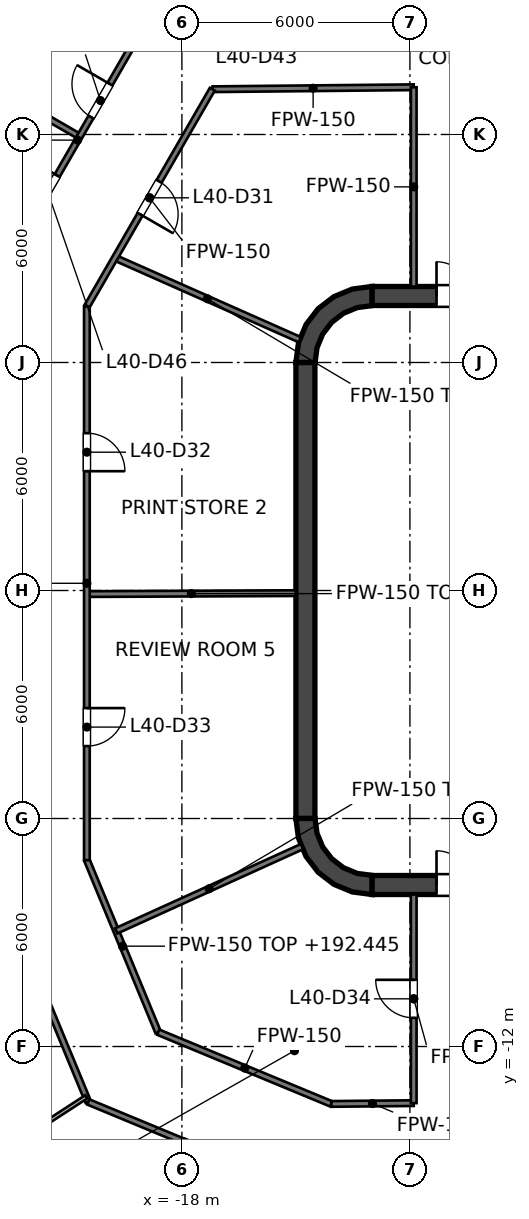
"""IFC4 building model, lengths in metres.
Left out: names, types, materials, properties, quantities, classifications, styles, units other than length and angle.
Written with IfcOpenShell. Run it as: python <this file> out.ifc"""

import sys

from ifc_helpers import new_model, si_unit, direction, frame, frame_2d, origin, place, context, subcontext, project, spatial, polyline, rectangle, outline, extrude, element, fill, save


model = new_model("IFC4")
c1 = context("Model", 3, precision=1e-05, world=origin(), true_north=direction((0.0, 1.0)))
c2 = subcontext(c1, "Body", "Model", "MODEL_VIEW")
j1 = project(units=[si_unit("LENGTHUNIT", "METRE"), si_unit("PLANEANGLEUNIT", "RADIAN")], contexts=[c1])
p1 = place(None, origin())
s1 = spatial("IfcSite", under=j1, at=p1, CompositionType="ELEMENT")
p2 = place(p1, origin())
s2 = spatial("IfcBuilding", under=s1, at=p2, CompositionType="ELEMENT")
p3 = place(p2, frame((0.0, 0.0, 189.6)))
s3 = spatial("IfcBuildingStorey", under=s2, at=p3, CompositionType="ELEMENT", Elevation=189.6)
p4 = place(p3, frame((-13.0, 7.75, 0.0), z_axis=(0.0, 0.0, 1.0), x_axis=(1.0, 0.0, 0.0)))
e1 = element("IfcWall", 1, at=p4, inside=s3, PredefinedType="SHEAR", context=c2, shape_type="SweptSolid", body=[
    extrude(rectangle(XDim=26.0, YDim=0.5, at=frame_2d((13.0, 0.0))), origin(), (0.0, 0.0, 1.0), 4.0),
])
p5 = place(p4, frame((1.7, 0.0, 0.0)))
e2 = element("IfcOpeningElement", 2, at=p5, cuts=e1, PredefinedType="OPENING", context=c2, shape_type="SweptSolid", body=[
    extrude(rectangle(XDim=1.8, YDim=2.1, at=frame_2d((0.9, 1.05))), frame((0.0, 0.25, 0.0), z_axis=(0.0, -1.0, 0.0), x_axis=(1.0, 0.0, 0.0)), (0.0, 0.0, 1.0), 0.5),
])
p6 = place(p4, frame((22.5, 0.0, 0.0)))
e3 = element("IfcOpeningElement", 3, at=p6, cuts=e1, PredefinedType="OPENING", context=c2, shape_type="SweptSolid", body=[
    extrude(rectangle(XDim=1.8, YDim=2.1, at=frame_2d((0.9, 1.05))), frame((0.0, 0.25, 0.0), z_axis=(0.0, -1.0, 0.0), x_axis=(1.0, 0.0, 0.0)), (0.0, 0.0, 1.0), 0.5),
])
p7 = place(p3, frame((-13.0, -7.75, 0.0), z_axis=(0.0, 0.0, 1.0), x_axis=(1.0, 0.0, 0.0)))
e4 = element("IfcWall", 4, at=p7, inside=s3, PredefinedType="SHEAR", context=c2, shape_type="SweptSolid", body=[
    extrude(rectangle(XDim=26.0, YDim=0.5, at=frame_2d((13.0, 0.0))), origin(), (0.0, 0.0, 1.0), 4.0),
])
p8 = place(p7, frame((1.7, 0.0, 0.0)))
e5 = element("IfcOpeningElement", 5, at=p8, cuts=e4, PredefinedType="OPENING", context=c2, shape_type="SweptSolid", body=[
    extrude(rectangle(XDim=1.8, YDim=2.1, at=frame_2d((0.9, 1.05))), frame((0.0, 0.25, 0.0), z_axis=(0.0, -1.0, 0.0), x_axis=(1.0, 0.0, 0.0)), (0.0, 0.0, 1.0), 0.5),
])
p9 = place(p7, frame((22.5, 0.0, 0.0)))
e6 = element("IfcOpeningElement", 6, at=p9, cuts=e4, PredefinedType="OPENING", context=c2, shape_type="SweptSolid", body=[
    extrude(rectangle(XDim=1.8, YDim=2.1, at=frame_2d((0.9, 1.05))), frame((0.0, 0.25, 0.0), z_axis=(0.0, -1.0, 0.0), x_axis=(1.0, 0.0, 0.0)), (0.0, 0.0, 1.0), 0.5),
])
p10 = place(p3, frame((-14.75, -6.0, 0.0), z_axis=(0.0, 0.0, 1.0), x_axis=(0.0, 1.0, 0.0)))
e7 = element("IfcWall", 7, at=p10, inside=s3, PredefinedType="SHEAR", context=c2, shape_type="SweptSolid", body=[
    extrude(rectangle(XDim=12.0, YDim=0.5, at=frame_2d((6.0, 0.0))), origin(), (0.0, 0.0, 1.0), 4.0),
])
p11 = place(p3, origin())
e8 = element("IfcWall", 8, at=p11, inside=s3, PredefinedType="SHEAR", context=c2, shape_type="SweptSolid", body=[
    extrude(outline(polyline([(-15.0, 6.0), (-14.496, 6.0), (-14.445, 6.387), (-14.295, 6.748), (-14.058, 7.058), (-13.748, 7.295), (-13.387, 7.445), (-13.0, 7.496), (-13.0, 8.0), (-13.518, 7.932), (-14.0, 7.732), (-14.414, 7.414), (-14.732, 7.0), (-14.932, 6.518), (-15.0, 6.0)])), origin(), (0.0, 0.0, 1.0), 4.0),
])
e9 = element("IfcWall", 9, at=p11, inside=s3, PredefinedType="SHEAR", context=c2, shape_type="SweptSolid", body=[
    extrude(outline(polyline([(-13.0, -8.0), (-13.0, -7.496), (-13.387, -7.445), (-13.748, -7.295), (-14.058, -7.058), (-14.295, -6.748), (-14.445, -6.387), (-14.496, -6.0), (-15.0, -6.0), (-14.932, -6.518), (-14.732, -7.0), (-14.414, -7.414), (-14.0, -7.732), (-13.518, -7.932), (-13.0, -8.0)])), origin(), (0.0, 0.0, 1.0), 4.0),
])
p12 = place(p3, frame((-11.8, -7.5, 0.0), z_axis=(0.0, 0.0, 1.0), x_axis=(0.0, 1.0, 0.0)))
e10 = element("IfcWall", 10, at=p12, inside=s3, PredefinedType="SOLIDWALL", context=c2, shape_type="SweptSolid", body=[
    extrude(rectangle(XDim=15.0, YDim=0.4, at=frame_2d((7.5, 0.0))), origin(), (0.0, 0.0, 1.0), 3.85),
])
p13 = place(p12, frame((11.3, 0.0, 0.0)))
e11 = element("IfcOpeningElement", 11, at=p13, cuts=e10, PredefinedType="OPENING", context=c2, shape_type="SweptSolid", body=[
    extrude(rectangle(XDim=1.1, YDim=2.1, at=frame_2d((0.55, 1.05))), frame((0.0, 0.2, 0.0), z_axis=(0.0, -1.0, 0.0), x_axis=(1.0, 0.0, 0.0)), (0.0, 0.0, 1.0), 0.4),
])
p14 = place(p12, frame((8.4, 0.0, 0.0)))
e12 = element("IfcOpeningElement", 12, at=p14, cuts=e10, PredefinedType="OPENING", context=c2, shape_type="SweptSolid", body=[
    extrude(rectangle(XDim=1.1, YDim=2.1, at=frame_2d((0.55, 1.05))), frame((0.0, 0.2, 0.0), z_axis=(0.0, -1.0, 0.0), x_axis=(1.0, 0.0, 0.0)), (0.0, 0.0, 1.0), 0.4),
])
p15 = place(p12, frame((5.5, 0.0, 0.0)))
e13 = element("IfcOpeningElement", 13, at=p15, cuts=e10, PredefinedType="OPENING", context=c2, shape_type="SweptSolid", body=[
    extrude(rectangle(XDim=1.1, YDim=2.1, at=frame_2d((0.55, 1.05))), frame((0.0, 0.2, 0.0), z_axis=(0.0, -1.0, 0.0), x_axis=(1.0, 0.0, 0.0)), (0.0, 0.0, 1.0), 0.4),
])
p16 = place(p12, frame((13.697, 0.0, 0.0)))
e14 = element("IfcOpeningElement", 14, at=p16, cuts=e10, PredefinedType="OPENING", context=c2, shape_type="SweptSolid", body=[
    extrude(rectangle(XDim=0.9, YDim=2.1, at=frame_2d((0.45, 1.05))), frame((0.0, 0.2, 0.0), z_axis=(0.0, -1.0, 0.0), x_axis=(1.0, 0.0, 0.0)), (0.0, 0.0, 1.0), 0.4),
])
p17 = place(p12, frame((0.403, 0.0, 0.0)))
e15 = element("IfcOpeningElement", 15, at=p17, cuts=e10, PredefinedType="OPENING", context=c2, shape_type="SweptSolid", body=[
    extrude(rectangle(XDim=0.9, YDim=2.1, at=frame_2d((0.45, 1.05))), frame((0.0, 0.2, 0.0), z_axis=(0.0, -1.0, 0.0), x_axis=(1.0, 0.0, 0.0)), (0.0, 0.0, 1.0), 0.4),
])
e16 = element("IfcWall", 16, at=p11, inside=s3, PredefinedType="SOLIDWALL", context=c2, shape_type="SweptSolid", body=[
    extrude(outline(polyline([(-12.0, -5.925), (-12.0, -5.675), (-14.25, -5.675), (-14.25, -3.025), (-12.0, -3.025), (-12.0, -2.775), (-14.25, -2.775), (-14.25, -0.125), (-12.0, -0.125), (-12.0, 0.125), (-14.25, 0.125), (-14.25, 2.775), (-12.0, 2.775), (-12.0, 3.025), (-14.25, 3.025), (-14.25, 5.675), (-12.0, 5.675), (-12.0, 5.925), (-14.25, 5.925), (-14.5, 5.925), (-14.5, 5.675), (-14.5, 3.025), (-14.5, 2.775), (-14.5, 0.125), (-14.5, -0.125), (-14.5, -2.775), (-14.5, -3.025), (-14.5, -5.675), (-14.5, -5.925), (-14.25, -5.925), (-12.0, -5.925)])), origin(), (0.0, 0.0, 1.0), 3.85),
])
p18 = place(p3, frame((-22.9, -7.572, 0.0), z_axis=(0.0, 0.0, 1.0), x_axis=(0.382367581622, -0.924010298928, 0.0)))
e17 = element("IfcWall", 17, at=p18, inside=s3, PredefinedType="PARTITIONING", context=c2, shape_type="SweptSolid", body=[
    extrude(rectangle(XDim=6.374, YDim=0.15, at=frame_2d((3.187, 0.0))), origin(), (0.0, 0.0, 1.0), 2.777),
])
p19 = place(p18, frame((2.6, 0.0, 0.0)))
e18 = element("IfcOpeningElement", 18, at=p19, cuts=e17, PredefinedType="OPENING", context=c2, shape_type="SweptSolid", body=[
    extrude(rectangle(XDim=1.0, YDim=2.1, at=frame_2d((0.5, 1.05))), frame((0.0, 0.075, 0.0), z_axis=(0.0, -1.0, 0.0), x_axis=(1.0, 0.0, 0.0)), (0.0, 0.0, 1.0), 0.15),
])
p20 = place(p3, frame((-20.5, -7.095, 0.0), z_axis=(0.0, 0.0, 1.0), x_axis=(0.382364990163, -0.924011371303, 0.0)))
e19 = element("IfcWall", 19, at=p20, inside=s3, PredefinedType="PARTITIONING", context=c2, shape_type="SweptSolid", body=[
    extrude(rectangle(XDim=4.902, YDim=0.15, at=frame_2d((2.451, 0.0))), origin(), (0.0, 0.0, 1.0), 2.845),
])
p21 = place(p3, frame((-24.433, 14.106, 0.0), z_axis=(0.0, 0.0, 1.0), x_axis=(0.866048255864, -0.499960416948, 0.0)))
e20 = element("IfcWall", 20, at=p21, inside=s3, PredefinedType="PARTITIONING", context=c2, shape_type="SweptSolid", body=[
    extrude(rectangle(XDim=4.322, YDim=0.15, at=frame_2d((2.161, 0.0))), origin(), (0.0, 0.0, 1.0), 2.845),
])
p22 = place(p3, frame((-19.76, 8.755, 0.0), z_axis=(0.0, 0.0, 1.0), x_axis=(0.91424834547, -0.405154245695, 0.0)))
e21 = element("IfcWall", 21, at=p22, inside=s3, PredefinedType="PARTITIONING", context=c2, shape_type="SweptSolid", body=[
    extrude(rectangle(XDim=5.318, YDim=0.15, at=frame_2d((2.659, 0.0))), origin(), (0.0, 0.0, 1.0), 2.845),
])
p23 = place(p3, frame((-20.46, -13.46, 0.0), z_axis=(0.0, 0.0, 1.0), x_axis=(0.923801547606, -0.382871650349, 0.0)))
e22 = element("IfcWall", 22, at=p23, inside=s3, PredefinedType="PARTITIONING", context=c2, shape_type="SweptSolid", body=[
    extrude(rectangle(XDim=6.415, YDim=0.15, at=frame_2d((3.208, 0.0))), origin(), (0.0, 0.0, 1.0), 2.777),
])
p24 = place(p23, frame((2.707, 0.0, 0.0)))
e23 = element("IfcOpeningElement", 23, at=p24, cuts=e22, PredefinedType="OPENING", context=c2, shape_type="SweptSolid", body=[
    extrude(rectangle(XDim=1.0, YDim=2.1, at=frame_2d((0.5, 1.05))), frame((0.0, 0.075, 0.0), z_axis=(0.0, -1.0, 0.0), x_axis=(1.0, 0.0, 0.0)), (0.0, 0.0, 1.0), 0.15),
])
p25 = place(p3, frame((-18.623, -11.623, 0.0), z_axis=(0.0, 0.0, 1.0), x_axis=(0.923791670587, -0.38289548098, 0.0)))
e24 = element("IfcWall", 24, at=p25, inside=s3, PredefinedType="PARTITIONING", context=c2, shape_type="SweptSolid", body=[
    extrude(rectangle(XDim=4.931, YDim=0.15, at=frame_2d((2.465, 0.0))), origin(), (0.0, 0.0, 1.0), 2.777),
])
p26 = place(p3, frame((-20.5, -0.094, 0.0), z_axis=(0.0, 0.0, 1.0), x_axis=(0.999990148138, 0.004438876723, 0.0)))
e25 = element("IfcWall", 25, at=p26, inside=s3, PredefinedType="PARTITIONING", context=c2, shape_type="SweptSolid", body=[
    extrude(rectangle(XDim=5.5, YDim=0.15, at=frame_2d((2.75, 0.0))), origin(), (0.0, 0.0, 1.0), 2.768),
])
p27 = place(p3, frame((-14.068, -13.511, 0.0), z_axis=(0.0, 0.0, 1.0), x_axis=(0.999950911515, 0.009908307647, 0.0)))
e26 = element("IfcWall", 26, at=p27, inside=s3, PredefinedType="PARTITIONING", context=c2, shape_type="SweptSolid", body=[
    extrude(rectangle(XDim=2.168, YDim=0.15, at=frame_2d((1.084, 0.0))), origin(), (0.0, 0.0, 1.0), 2.777),
])
p28 = place(p3, frame((-17.194, 13.191, 0.0), z_axis=(0.0, 0.0, 1.0), x_axis=(0.999950853109, 0.009914200296, 0.0)))
e27 = element("IfcWall", 27, at=p28, inside=s3, PredefinedType="PARTITIONING", context=c2, shape_type="SweptSolid", body=[
    extrude(rectangle(XDim=5.294, YDim=0.15, at=frame_2d((2.647, 0.0))), origin(), (0.0, 0.0, 1.0), 2.777),
])
p29 = place(p3, frame((-19.728, -8.958, 0.0), z_axis=(0.0, 0.0, 1.0), x_axis=(0.910629511797, 0.413223779863, 0.0)))
e28 = element("IfcWall", 28, at=p29, inside=s3, PredefinedType="PARTITIONING", context=c2, shape_type="SweptSolid", body=[
    extrude(rectangle(XDim=5.368, YDim=0.15, at=frame_2d((2.684, 0.0))), origin(), (0.0, 0.0, 1.0), 3.7),
])
p30 = place(p3, frame((-20.5, 7.474, 0.0), z_axis=(0.0, 0.0, 1.0), x_axis=(0.499957196903, 0.866050114754, 0.0)))
e29 = element("IfcWall", 29, at=p30, inside=s3, PredefinedType="PARTITIONING", context=c2, shape_type="SweptSolid", body=[
    extrude(rectangle(XDim=6.602, YDim=0.15, at=frame_2d((3.301, 0.0))), origin(), (0.0, 0.0, 1.0), 2.777),
])
p31 = place(p30, frame((2.802, 0.0, 0.0)))
e30 = element("IfcOpeningElement", 30, at=p31, cuts=e29, PredefinedType="OPENING", context=c2, shape_type="SweptSolid", body=[
    extrude(rectangle(XDim=1.0, YDim=2.1, at=frame_2d((0.5, 1.05))), frame((0.0, 0.075, 0.0), z_axis=(0.0, -1.0, 0.0), x_axis=(1.0, 0.0, 0.0)), (0.0, 0.0, 1.0), 0.15),
])
p32 = place(p3, frame((-22.9, 8.117, 0.0), z_axis=(0.0, 0.0, 1.0), x_axis=(0.499950307977, 0.866054091587, 0.0)))
e31 = element("IfcWall", 31, at=p32, inside=s3, PredefinedType="PARTITIONING", context=c2, shape_type="SweptSolid", body=[
    extrude(rectangle(XDim=8.626, YDim=0.15, at=frame_2d((4.313, 0.0))), origin(), (0.0, 0.0, 1.0), 2.777),
])
p33 = place(p32, frame((5.015, 0.0, 0.0)))
e32 = element("IfcOpeningElement", 32, at=p33, cuts=e31, PredefinedType="OPENING", context=c2, shape_type="SweptSolid", body=[
    extrude(rectangle(XDim=1.0, YDim=2.1, at=frame_2d((0.5, 1.05))), frame((0.0, 0.075, 0.0), z_axis=(0.0, -1.0, 0.0), x_axis=(1.0, 0.0, 0.0)), (0.0, 0.0, 1.0), 0.15),
])
p34 = place(p32, frame((2.237, 0.0, 0.0)))
e33 = element("IfcOpeningElement", 33, at=p34, cuts=e31, PredefinedType="OPENING", context=c2, shape_type="SweptSolid", body=[
    extrude(rectangle(XDim=1.0, YDim=2.1, at=frame_2d((0.5, 1.05))), frame((0.0, 0.075, 0.0), z_axis=(0.0, -1.0, 0.0), x_axis=(1.0, 0.0, 0.0)), (0.0, 0.0, 1.0), 0.15),
])
p35 = place(p3, frame((-11.9, -13.49, 0.0), z_axis=(0.0, 0.0, 1.0), x_axis=(0.0, 1.0, 0.0)))
e34 = element("IfcWall", 34, at=p35, inside=s3, PredefinedType="PARTITIONING", context=c2, shape_type="SweptSolid", body=[
    extrude(rectangle(XDim=5.49, YDim=0.15, at=frame_2d((2.745, 0.0))), origin(), (0.0, 0.0, 1.0), 2.777),
])
p36 = place(p35, frame((2.245, 0.0, 0.0)))
e35 = element("IfcOpeningElement", 35, at=p36, cuts=e34, PredefinedType="OPENING", context=c2, shape_type="SweptSolid", body=[
    extrude(rectangle(XDim=1.0, YDim=2.1, at=frame_2d((0.5, 1.05))), frame((0.0, 0.075, 0.0), z_axis=(0.0, -1.0, 0.0), x_axis=(1.0, 0.0, 0.0)), (0.0, 0.0, 1.0), 0.15),
])
p37 = place(p3, frame((-11.9, 8.0, 0.0), z_axis=(0.0, 0.0, 1.0), x_axis=(0.0, 1.0, 0.0)))
e36 = element("IfcWall", 36, at=p37, inside=s3, PredefinedType="PARTITIONING", context=c2, shape_type="SweptSolid", body=[
    extrude(rectangle(XDim=5.243, YDim=0.15, at=frame_2d((2.622, 0.0))), origin(), (0.0, 0.0, 1.0), 2.777),
])
p38 = place(p3, frame((-20.5, -7.095, 0.0), z_axis=(0.0, 0.0, 1.0), x_axis=(0.0, 1.0, 0.0)))
e37 = element("IfcWall", 37, at=p38, inside=s3, PredefinedType="PARTITIONING", context=c2, shape_type="SweptSolid", body=[
    extrude(rectangle(XDim=14.569, YDim=0.15, at=frame_2d((7.285, 0.0))), origin(), (0.0, 0.0, 1.0), 2.768),
])
p39 = place(p38, frame((10.234, 0.0, 0.0)))
e38 = element("IfcOpeningElement", 38, at=p39, cuts=e37, PredefinedType="OPENING", context=c2, shape_type="SweptSolid", body=[
    extrude(rectangle(XDim=1.0, YDim=2.1, at=frame_2d((0.5, 1.05))), frame((0.0, 0.075, 0.0), z_axis=(0.0, -1.0, 0.0), x_axis=(1.0, 0.0, 0.0)), (0.0, 0.0, 1.0), 0.15),
])
p40 = place(p38, frame((3.0, 0.0, 0.0)))
e39 = element("IfcOpeningElement", 39, at=p40, cuts=e37, PredefinedType="OPENING", context=c2, shape_type="SweptSolid", body=[
    extrude(rectangle(XDim=1.0, YDim=2.1, at=frame_2d((0.5, 1.05))), frame((0.0, 0.075, 0.0), z_axis=(0.0, -1.0, 0.0), x_axis=(1.0, 0.0, 0.0)), (0.0, 0.0, 1.0), 0.15),
])
p41 = place(p3, frame((-23.271, -15.113, 0.0), z_axis=(0.0, 0.0, 1.0), x_axis=(0.83866769183, 0.544643463819, 0.0)))
e40 = element("IfcWall", 40, at=p41, inside=s3, PredefinedType="PARTITIONING", context=c2, shape_type="SweptSolid", body=[
    extrude(rectangle(XDim=3.285, YDim=0.1, at=frame_2d((1.643, 0.0))), origin(), (0.0, 0.0, 1.0), 3.273),
])
p42 = place(p13, origin())
e41 = element("IfcDoor", 41, at=p42, inside=s3, OperationType="DOUBLE_DOOR_SLIDING", PredefinedType="DOOR", context=c2, shape_type="SweptSolid", body=[
    extrude(rectangle(XDim=1.1, YDim=2.1, at=frame_2d((0.55, 1.05))), frame((0.0, 0.025, 0.0), z_axis=(0.0, -1.0, 0.0), x_axis=(1.0, 0.0, 0.0)), (0.0, 0.0, 1.0), 0.05),
])
fill(e11, e41)
p43 = place(p14, origin())
e42 = element("IfcDoor", 42, at=p43, inside=s3, OperationType="DOUBLE_DOOR_SLIDING", PredefinedType="DOOR", context=c2, shape_type="SweptSolid", body=[
    extrude(rectangle(XDim=1.1, YDim=2.1, at=frame_2d((0.55, 1.05))), frame((0.0, 0.025, 0.0), z_axis=(0.0, -1.0, 0.0), x_axis=(1.0, 0.0, 0.0)), (0.0, 0.0, 1.0), 0.05),
])
fill(e12, e42)
p44 = place(p15, origin())
e43 = element("IfcDoor", 43, at=p44, inside=s3, OperationType="DOUBLE_DOOR_SLIDING", PredefinedType="DOOR", context=c2, shape_type="SweptSolid", body=[
    extrude(rectangle(XDim=1.1, YDim=2.1, at=frame_2d((0.55, 1.05))), frame((0.0, 0.025, 0.0), z_axis=(0.0, -1.0, 0.0), x_axis=(1.0, 0.0, 0.0)), (0.0, 0.0, 1.0), 0.05),
])
fill(e13, e43)
p45 = place(p16, origin())
e44 = element("IfcDoor", 44, at=p45, inside=s3, OperationType="SINGLE_SWING_LEFT", PredefinedType="DOOR", context=c2, shape_type="SweptSolid", body=[
    extrude(rectangle(XDim=0.9, YDim=2.1, at=frame_2d((0.45, 1.05))), frame((0.0, 0.025, 0.0), z_axis=(0.0, -1.0, 0.0), x_axis=(1.0, 0.0, 0.0)), (0.0, 0.0, 1.0), 0.05),
])
fill(e14, e44)
p46 = place(p17, origin())
e45 = element("IfcDoor", 45, at=p46, inside=s3, OperationType="SINGLE_SWING_LEFT", PredefinedType="DOOR", context=c2, shape_type="SweptSolid", body=[
    extrude(rectangle(XDim=0.9, YDim=2.1, at=frame_2d((0.45, 1.05))), frame((0.0, 0.025, 0.0), z_axis=(0.0, -1.0, 0.0), x_axis=(1.0, 0.0, 0.0)), (0.0, 0.0, 1.0), 0.05),
])
fill(e15, e45)
p47 = place(p5, origin())
e46 = element("IfcDoor", 46, at=p47, inside=s3, OperationType="DOUBLE_DOOR_SINGLE_SWING", PredefinedType="DOOR", context=c2, shape_type="SweptSolid", body=[
    extrude(rectangle(XDim=1.8, YDim=2.1, at=frame_2d((0.9, 1.05))), frame((0.0, 0.025, 0.0), z_axis=(0.0, -1.0, 0.0), x_axis=(1.0, 0.0, 0.0)), (0.0, 0.0, 1.0), 0.05),
])
fill(e2, e46)
p48 = place(p8, origin())
e47 = element("IfcDoor", 47, at=p48, inside=s3, OperationType="DOUBLE_DOOR_SINGLE_SWING", PredefinedType="DOOR", context=c2, shape_type="SweptSolid", body=[
    extrude(rectangle(XDim=1.8, YDim=2.1, at=frame_2d((0.9, 1.05))), frame((0.0, 0.025, 0.0), z_axis=(0.0, -1.0, 0.0), x_axis=(1.0, 0.0, 0.0)), (0.0, 0.0, 1.0), 0.05),
])
fill(e5, e47)
p49 = place(p31, origin())
e48 = element("IfcDoor", 48, at=p49, inside=s3, OperationType="SINGLE_SWING_LEFT", PredefinedType="DOOR", context=c2, shape_type="SweptSolid", body=[
    extrude(rectangle(XDim=1.0, YDim=2.1, at=frame_2d((0.5, 1.05))), frame((0.0, 0.025, 0.0), z_axis=(0.0, -1.0, 0.0), x_axis=(1.0, 0.0, 0.0)), (0.0, 0.0, 1.0), 0.05),
])
fill(e30, e48)
p50 = place(p39, origin())
e49 = element("IfcDoor", 49, at=p50, inside=s3, OperationType="SINGLE_SWING_LEFT", PredefinedType="DOOR", context=c2, shape_type="SweptSolid", body=[
    extrude(rectangle(XDim=1.0, YDim=2.1, at=frame_2d((0.5, 1.05))), frame((0.0, 0.025, 0.0), z_axis=(0.0, -1.0, 0.0), x_axis=(1.0, 0.0, 0.0)), (0.0, 0.0, 1.0), 0.05),
])
fill(e38, e49)
p51 = place(p40, origin())
e50 = element("IfcDoor", 50, at=p51, inside=s3, OperationType="SINGLE_SWING_RIGHT", PredefinedType="DOOR", context=c2, shape_type="SweptSolid", body=[
    extrude(rectangle(XDim=1.0, YDim=2.1, at=frame_2d((0.5, 1.05))), frame((0.0, 0.025, 0.0), z_axis=(0.0, -1.0, 0.0), x_axis=(1.0, 0.0, 0.0)), (0.0, 0.0, 1.0), 0.05),
])
fill(e39, e50)
p52 = place(p36, origin())
e51 = element("IfcDoor", 51, at=p52, inside=s3, OperationType="SINGLE_SWING_RIGHT", PredefinedType="DOOR", context=c2, shape_type="SweptSolid", body=[
    extrude(rectangle(XDim=1.0, YDim=2.1, at=frame_2d((0.5, 1.05))), frame((0.0, 0.025, 0.0), z_axis=(0.0, -1.0, 0.0), x_axis=(1.0, 0.0, 0.0)), (0.0, 0.0, 1.0), 0.05),
])
fill(e35, e51)
p53 = place(p33, origin())
e52 = element("IfcDoor", 52, at=p53, inside=s3, OperationType="SINGLE_SWING_RIGHT", PredefinedType="DOOR", context=c2, shape_type="SweptSolid", body=[
    extrude(rectangle(XDim=1.0, YDim=2.1, at=frame_2d((0.5, 1.05))), frame((0.0, 0.025, 0.0), z_axis=(0.0, -1.0, 0.0), x_axis=(1.0, 0.0, 0.0)), (0.0, 0.0, 1.0), 0.05),
])
fill(e32, e52)
p54 = place(p34, origin())
e53 = element("IfcDoor", 53, at=p54, inside=s3, OperationType="SINGLE_SWING_RIGHT", PredefinedType="DOOR", context=c2, shape_type="SweptSolid", body=[
    extrude(rectangle(XDim=1.0, YDim=2.1, at=frame_2d((0.5, 1.05))), frame((0.0, 0.025, 0.0), z_axis=(0.0, -1.0, 0.0), x_axis=(1.0, 0.0, 0.0)), (0.0, 0.0, 1.0), 0.05),
])
fill(e33, e53)
save(model, sys.argv[1])
